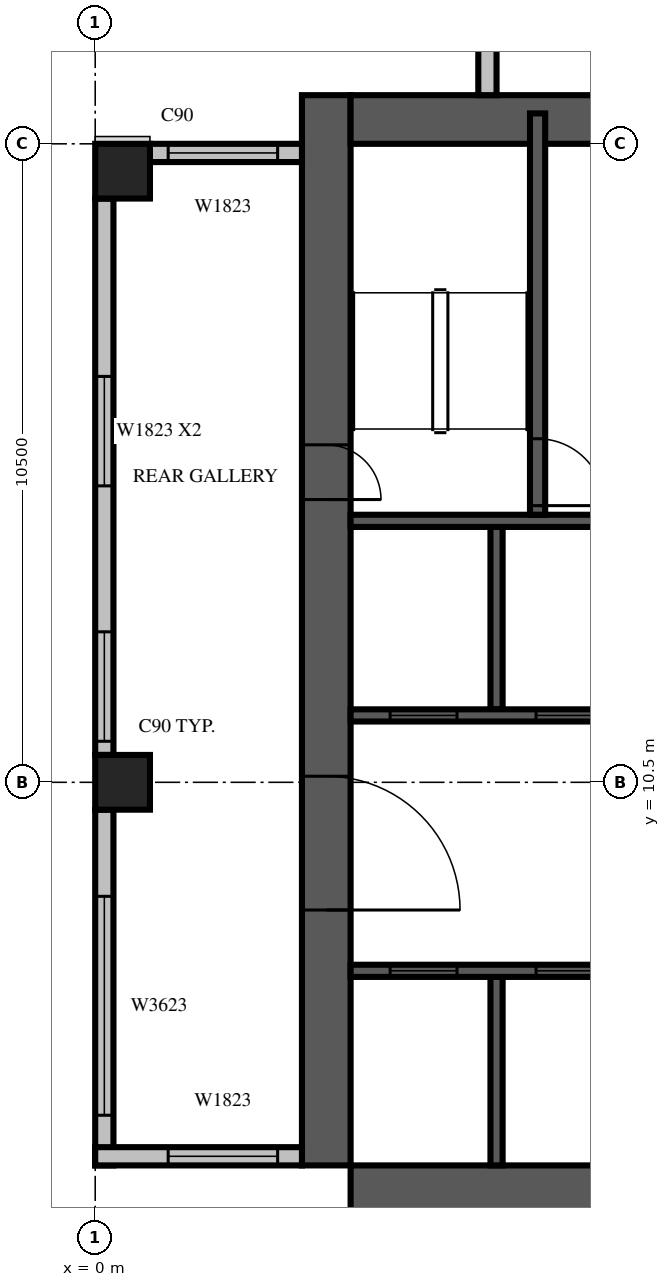
"""IFC4 building model, lengths in metres.
Left out: names, types, materials, properties, quantities, classifications, styles, units other than length and angle.
Written with IfcOpenShell. Run it as: python <this file> out.ifc"""

import sys

from ifc_helpers import new_model, si_unit, direction, frame, frame_2d, origin, origin_2d, place, context, subcontext, project, spatial, rectangle, extrude, source, transform, mapped, element, fill, save


model = new_model("IFC4")
c1 = context("Model", 3, precision=1e-05, world=origin(), true_north=direction((0.0, 1.0)))
c2 = subcontext(c1, "Body", "Model", "MODEL_VIEW")
j1 = project(units=[si_unit("LENGTHUNIT", "METRE"), si_unit("PLANEANGLEUNIT", "RADIAN")], contexts=[c1])
p1 = place(None, origin())
s1 = spatial("IfcSite", under=j1, at=p1, CompositionType="ELEMENT")
p2 = place(p1, origin())
s2 = spatial("IfcBuilding", under=s1, at=p2, CompositionType="ELEMENT")
p3 = place(p2, frame((0.0, 0.0, 204.4)))
s3 = spatial("IfcBuildingStorey", under=s2, at=p3, CompositionType="ELEMENT", Elevation=204.4)
m1 = source(origin(), c2, "Body", "SweptSolid", [
    extrude(rectangle(XDim=0.9, YDim=0.9, at=origin_2d()), origin(), (0.0, 0.0, 1.0), 3.8),
])
for number, where, z_axis, x_axis in (
    (1, (0.45, 10.5, 0.0), (0.0, 0.0, 1.0), (1.0, 0.0, 0.0)),
    (2, (0.45, 20.55, 0.0), (0.0, 0.0, 1.0), (1.0, 0.0, 0.0)),
):
    element("IfcColumn", number, at=place(p3, frame(where, z_axis=z_axis, x_axis=x_axis)), inside=s3, PredefinedType="COLUMN", context=c2, shape_type="MappedRepresentation", body=[
        mapped(m1, transform((0.0, 0.0, 0.0), scale=1.0)),
    ])
m2 = source(origin(), c2, "Body", "SweptSolid", [
    extrude(rectangle(XDim=17.6, YDim=0.8, at=frame_2d((8.8, 0.0))), origin(), (0.0, 0.0, 1.0), 3.8),
])
p4 = place(p3, frame((3.8, 4.2, 0.0), z_axis=(0.0, 0.0, 1.0), x_axis=(0.0, 1.0, 0.0)))
e3 = element("IfcWall", 3, at=p4, inside=s3, PredefinedType="SHEAR", context=c2, shape_type="MappedRepresentation", body=[
    mapped(m2, transform((0.0, 0.0, 0.0), scale=1.0)),
])
m3 = source(origin(), c2, "Body", "SweptSolid", [
    extrude(rectangle(XDim=2.2, YDim=2.1, at=frame_2d((1.1, 1.05))), frame((0.0, 0.41, 0.0), z_axis=(0.0, -1.0, 0.0), x_axis=(1.0, 0.0, 0.0)), (0.0, 0.0, 1.0), 0.82),
])
p5 = place(p4, frame((4.2, 0.0, 0.0)))
e4 = element("IfcOpeningElement", 4, at=p5, cuts=e3, PredefinedType="OPENING", context=c2, shape_type="MappedRepresentation", body=[
    mapped(m3, transform((0.0, 0.0, 0.0), scale=1.0)),
])
m4 = source(origin(), c2, "Body", "SweptSolid", [
    extrude(rectangle(XDim=0.9, YDim=2.1, at=frame_2d((0.45, 1.05))), frame((0.0, 0.41, 0.0), z_axis=(0.0, -1.0, 0.0), x_axis=(1.0, 0.0, 0.0)), (0.0, 0.0, 1.0), 0.82),
])
p6 = place(p4, frame((10.95, 0.0, 0.0)))
e5 = element("IfcOpeningElement", 5, at=p6, cuts=e3, PredefinedType="OPENING", context=c2, shape_type="MappedRepresentation", body=[
    mapped(m4, transform((0.0, 0.0, 0.0), scale=1.0)),
])
p7 = place(p3, frame((4.2, 3.8, 0.0), z_axis=(0.0, 0.0, 1.0), x_axis=(1.0, 0.0, 0.0)))
e6 = element("IfcWall", 6, at=p7, inside=s3, PredefinedType="SHEAR", context=c2, shape_type="MappedRepresentation", body=[
    mapped(m2, transform((0.0, 0.0, 0.0), scale=1.0)),
])
p8 = place(p7, frame((11.55, 0.0, 0.0)))
e7 = element("IfcOpeningElement", 7, at=p8, cuts=e6, PredefinedType="OPENING", context=c2, shape_type="MappedRepresentation", body=[
    mapped(m4, transform((0.0, 0.0, 0.0), scale=1.0)),
])
m5 = source(origin(), c2, "Body", "SweptSolid", [
    extrude(rectangle(XDim=16.8, YDim=0.8, at=frame_2d((8.4, 0.0))), origin(), (0.0, 0.0, 1.0), 3.8),
])
p9 = place(p3, frame((4.2, 21.4, 0.0), z_axis=(0.0, 0.0, 1.0), x_axis=(1.0, 0.0, 0.0)))
e8 = element("IfcWall", 8, at=p9, inside=s3, PredefinedType="SHEAR", context=c2, shape_type="MappedRepresentation", body=[
    mapped(m5, transform((0.0, 0.0, 0.0), scale=1.0)),
])
m6 = source(origin(), c2, "Body", "SweptSolid", [
    extrude(rectangle(XDim=1.2, YDim=2.1, at=frame_2d((0.6, 1.05))), frame((0.0, 0.41, 0.0), z_axis=(0.0, -1.0, 0.0), x_axis=(1.0, 0.0, 0.0)), (0.0, 0.0, 1.0), 0.82),
])
p10 = place(p9, frame((6.2, 0.0, 0.0)))
e9 = element("IfcOpeningElement", 9, at=p10, cuts=e8, PredefinedType="OPENING", context=c2, shape_type="MappedRepresentation", body=[
    mapped(m6, transform((0.0, 0.0, 0.0), scale=1.0)),
])
p11 = place(p3, frame((6.45, 38.4, 0.0), z_axis=(0.0, 0.0, 1.0), x_axis=(0.0, -1.0, 0.0)))
e10 = element("IfcWall", 10, at=p11, inside=s3, PredefinedType="STANDARD", context=c2, shape_type="SweptSolid", body=[
    extrude(rectangle(XDim=16.6, YDim=0.3, at=frame_2d((8.3, 0.0))), origin(), (0.0, 0.0, 1.0), 2.9),
])
m7 = source(origin(), c2, "Body", "SweptSolid", [
    extrude(rectangle(XDim=1.8, YDim=2.3, at=frame_2d((0.9, 1.15))), frame((0.0, 0.16, 0.0), z_axis=(0.0, -1.0, 0.0), x_axis=(1.0, 0.0, 0.0)), (0.0, 0.0, 1.0), 0.32),
])
p12 = place(p11, frame((1.15, 0.0, 0.6)))
e11 = element("IfcOpeningElement", 11, at=p12, cuts=e10, PredefinedType="OPENING", context=c2, shape_type="MappedRepresentation", body=[
    mapped(m7, transform((0.0, 0.0, 0.0), scale=1.0)),
])
p13 = place(p11, frame((5.162, 0.0, 0.6)))
e12 = element("IfcOpeningElement", 12, at=p13, cuts=e10, PredefinedType="OPENING", context=c2, shape_type="MappedRepresentation", body=[
    mapped(m7, transform((0.0, 0.0, 0.0), scale=1.0)),
])
p14 = place(p11, frame((9.438, 0.0, 0.6)))
e13 = element("IfcOpeningElement", 13, at=p14, cuts=e10, PredefinedType="OPENING", context=c2, shape_type="MappedRepresentation", body=[
    mapped(m7, transform((0.0, 0.0, 0.0), scale=1.0)),
])
m8 = source(origin(), c2, "Body", "SweptSolid", [
    extrude(rectangle(XDim=1.2, YDim=2.3, at=frame_2d((0.6, 1.15))), frame((0.0, 0.16, 0.0), z_axis=(0.0, -1.0, 0.0), x_axis=(1.0, 0.0, 0.0)), (0.0, 0.0, 1.0), 0.32),
])
p15 = place(p11, frame((14.338, 0.0, 0.6)))
e14 = element("IfcOpeningElement", 14, at=p15, cuts=e10, PredefinedType="OPENING", context=c2, shape_type="MappedRepresentation", body=[
    mapped(m8, transform((0.0, 0.0, 0.0), scale=1.0)),
])
p16 = place(p11, frame((11.887, 0.0, 0.6)))
e15 = element("IfcOpeningElement", 15, at=p16, cuts=e10, PredefinedType="OPENING", context=c2, shape_type="MappedRepresentation", body=[
    mapped(m7, transform((0.0, 0.0, 0.0), scale=1.0)),
])
m9 = source(origin(), c2, "Body", "SweptSolid", [
    extrude(rectangle(XDim=2.5, YDim=0.3, at=frame_2d((1.25, 0.0))), origin(), (0.0, 0.0, 1.0), 3.4),
])
p17 = place(p3, frame((3.4, 20.85, 0.0), z_axis=(0.0, 0.0, 1.0), x_axis=(-1.0, 0.0, 0.0)))
e16 = element("IfcWall", 16, at=p17, inside=s3, PredefinedType="STANDARD", context=c2, shape_type="MappedRepresentation", body=[
    mapped(m9, transform((0.0, 0.0, 0.0), scale=1.0)),
])
p18 = place(p17, frame((0.4, 0.0, 0.6)))
e17 = element("IfcOpeningElement", 17, at=p18, cuts=e16, PredefinedType="OPENING", context=c2, shape_type="MappedRepresentation", body=[
    mapped(m7, transform((0.0, 0.0, 0.0), scale=1.0)),
])
m10 = source(origin(), c2, "Body", "SweptSolid", [
    extrude(rectangle(XDim=9.15, YDim=0.3, at=frame_2d((4.575, 0.0))), origin(), (0.0, 0.0, 1.0), 3.4),
])
p19 = place(p3, frame((0.15, 20.1, 0.0), z_axis=(0.0, 0.0, 1.0), x_axis=(0.0, -1.0, 0.0)))
e18 = element("IfcWall", 18, at=p19, inside=s3, PredefinedType="STANDARD", context=c2, shape_type="MappedRepresentation", body=[
    mapped(m10, transform((0.0, 0.0, 0.0), scale=1.0)),
])
p20 = place(p19, frame((2.925, 0.0, 0.6)))
e19 = element("IfcOpeningElement", 19, at=p20, cuts=e18, PredefinedType="OPENING", context=c2, shape_type="MappedRepresentation", body=[
    mapped(m7, transform((0.0, 0.0, 0.0), scale=1.0)),
])
p21 = place(p19, frame((7.125, 0.0, 0.6)))
e20 = element("IfcOpeningElement", 20, at=p21, cuts=e18, PredefinedType="OPENING", context=c2, shape_type="MappedRepresentation", body=[
    mapped(m7, transform((0.0, 0.0, 0.0), scale=1.0)),
])
m11 = source(origin(), c2, "Body", "SweptSolid", [
    extrude(rectangle(XDim=5.85, YDim=0.3, at=frame_2d((2.925, 0.0))), origin(), (0.0, 0.0, 1.0), 3.4),
])
p22 = place(p3, frame((0.15, 10.05, 0.0), z_axis=(0.0, 0.0, 1.0), x_axis=(0.0, -1.0, 0.0)))
e21 = element("IfcWall", 21, at=p22, inside=s3, PredefinedType="STANDARD", context=c2, shape_type="MappedRepresentation", body=[
    mapped(m11, transform((0.0, 0.0, 0.0), scale=1.0)),
])
m12 = source(origin(), c2, "Body", "SweptSolid", [
    extrude(rectangle(XDim=3.6, YDim=2.3, at=frame_2d((1.8, 1.15))), frame((0.0, 0.16, 0.0), z_axis=(0.0, -1.0, 0.0), x_axis=(1.0, 0.0, 0.0)), (0.0, 0.0, 1.0), 0.32),
])
p23 = place(p22, frame((1.425, 0.0, 0.6)))
e22 = element("IfcOpeningElement", 22, at=p23, cuts=e21, PredefinedType="OPENING", context=c2, shape_type="MappedRepresentation", body=[
    mapped(m12, transform((0.0, 0.0, 0.0), scale=1.0)),
])
m13 = source(origin(), c2, "Body", "SweptSolid", [
    extrude(rectangle(XDim=3.4, YDim=0.3, at=frame_2d((1.7, 0.0))), origin(), (0.0, 0.0, 1.0), 3.4),
])
p24 = place(p3, frame((0.0, 4.35, 0.0), z_axis=(0.0, 0.0, 1.0), x_axis=(1.0, 0.0, 0.0)))
e23 = element("IfcWall", 23, at=p24, inside=s3, PredefinedType="STANDARD", context=c2, shape_type="MappedRepresentation", body=[
    mapped(m13, transform((0.0, 0.0, 0.0), scale=1.0)),
])
p25 = place(p24, frame((1.2, 0.0, 0.6)))
e24 = element("IfcOpeningElement", 24, at=p25, cuts=e23, PredefinedType="OPENING", context=c2, shape_type="MappedRepresentation", body=[
    mapped(m7, transform((0.0, 0.0, 0.0), scale=1.0)),
])
m14 = source(origin(), c2, "Body", "SweptSolid", [
    extrude(rectangle(XDim=3.1, YDim=0.2, at=frame_2d((1.55, 0.0))), origin(), (0.0, 0.0, 1.0), 3.8),
])
p26 = place(p3, frame((6.6, 4.2, 0.0), z_axis=(0.0, 0.0, 1.0), x_axis=(0.0, 1.0, 0.0)))
e25 = element("IfcWall", 25, at=p26, inside=s3, PredefinedType="SOLIDWALL", context=c2, shape_type="MappedRepresentation", body=[
    mapped(m14, transform((0.0, 0.0, 0.0), scale=1.0)),
])
m15 = source(origin(), c2, "Body", "SweptSolid", [
    extrude(rectangle(XDim=3.0, YDim=0.2, at=frame_2d((1.5, 0.0))), origin(), (0.0, 0.0, 1.0), 3.8),
])
p27 = place(p3, frame((6.6, 11.7, 0.0), z_axis=(0.0, 0.0, 1.0), x_axis=(0.0, 1.0, 0.0)))
e26 = element("IfcWall", 26, at=p27, inside=s3, PredefinedType="SOLIDWALL", context=c2, shape_type="MappedRepresentation", body=[
    mapped(m15, transform((0.0, 0.0, 0.0), scale=1.0)),
])
m16 = source(origin(), c2, "Body", "SweptSolid", [
    extrude(rectangle(XDim=9.6, YDim=0.2, at=frame_2d((4.8, 0.0))), origin(), (0.0, 0.0, 1.0), 3.8),
])
p28 = place(p3, frame((4.2, 7.4, 0.0), z_axis=(0.0, 0.0, 1.0), x_axis=(1.0, 0.0, 0.0)))
e27 = element("IfcWall", 27, at=p28, inside=s3, PredefinedType="SOLIDWALL", context=c2, shape_type="MappedRepresentation", body=[
    mapped(m16, transform((0.0, 0.0, 0.0), scale=1.0)),
])
m17 = source(origin(), c2, "Body", "SweptSolid", [
    extrude(rectangle(XDim=1.1, YDim=2.1, at=frame_2d((0.55, 1.05))), frame((0.0, 0.11, 0.0), z_axis=(0.0, -1.0, 0.0), x_axis=(1.0, 0.0, 0.0)), (0.0, 0.0, 1.0), 0.22),
])
p29 = place(p28, frame((0.65, 0.0, 0.0)))
e28 = element("IfcOpeningElement", 28, at=p29, cuts=e27, PredefinedType="OPENING", context=c2, shape_type="MappedRepresentation", body=[
    mapped(m17, transform((0.0, 0.0, 0.0), scale=1.0)),
])
p30 = place(p28, frame((3.05, 0.0, 0.0)))
e29 = element("IfcOpeningElement", 29, at=p30, cuts=e27, PredefinedType="OPENING", context=c2, shape_type="MappedRepresentation", body=[
    mapped(m17, transform((0.0, 0.0, 0.0), scale=1.0)),
])
p31 = place(p28, frame((5.45, 0.0, 0.0)))
e30 = element("IfcOpeningElement", 30, at=p31, cuts=e27, PredefinedType="OPENING", context=c2, shape_type="MappedRepresentation", body=[
    mapped(m17, transform((0.0, 0.0, 0.0), scale=1.0)),
])
p32 = place(p28, frame((7.85, 0.0, 0.0)))
e31 = element("IfcOpeningElement", 31, at=p32, cuts=e27, PredefinedType="OPENING", context=c2, shape_type="MappedRepresentation", body=[
    mapped(m17, transform((0.0, 0.0, 0.0), scale=1.0)),
])
m18 = source(origin(), c2, "Body", "SweptSolid", [
    extrude(rectangle(XDim=4.8, YDim=0.2, at=frame_2d((2.4, 0.0))), origin(), (0.0, 0.0, 1.0), 3.8),
])
p33 = place(p3, frame((4.2, 11.6, 0.0), z_axis=(0.0, 0.0, 1.0), x_axis=(1.0, 0.0, 0.0)))
e32 = element("IfcWall", 32, at=p33, inside=s3, PredefinedType="SOLIDWALL", context=c2, shape_type="MappedRepresentation", body=[
    mapped(m18, transform((0.0, 0.0, 0.0), scale=1.0)),
])
p34 = place(p33, frame((0.65, 0.0, 0.0)))
e33 = element("IfcOpeningElement", 33, at=p34, cuts=e32, PredefinedType="OPENING", context=c2, shape_type="MappedRepresentation", body=[
    mapped(m17, transform((0.0, 0.0, 0.0), scale=1.0)),
])
p35 = place(p33, frame((3.05, 0.0, 0.0)))
e34 = element("IfcOpeningElement", 34, at=p35, cuts=e32, PredefinedType="OPENING", context=c2, shape_type="MappedRepresentation", body=[
    mapped(m17, transform((0.0, 0.0, 0.0), scale=1.0)),
])
p36 = place(p3, frame((4.2, 14.8, 0.0), z_axis=(0.0, 0.0, 1.0), x_axis=(1.0, 0.0, 0.0)))
e35 = element("IfcWall", 35, at=p36, inside=s3, PredefinedType="SOLIDWALL", context=c2, shape_type="MappedRepresentation", body=[
    mapped(m18, transform((0.0, 0.0, 0.0), scale=1.0)),
])
m19 = source(origin(), c2, "Body", "SweptSolid", [
    extrude(rectangle(XDim=6.6, YDim=0.25, at=frame_2d((3.3, 0.0))), origin(), (0.0, 0.0, 1.0), 3.4),
])
p37 = place(p3, frame((7.275, 14.9, 0.0), z_axis=(0.0, 0.0, 1.0), x_axis=(0.0, 1.0, 0.0)))
e36 = element("IfcWall", 36, at=p37, inside=s3, PredefinedType="SOLIDWALL", context=c2, shape_type="MappedRepresentation", body=[
    mapped(m19, transform((0.0, 0.0, 0.0), scale=1.0)),
])
m20 = source(origin(), c2, "Body", "SweptSolid", [
    extrude(rectangle(XDim=1.1, YDim=2.1, at=frame_2d((0.55, 1.05))), frame((0.0, 0.135, 0.0), z_axis=(0.0, -1.0, 0.0), x_axis=(1.0, 0.0, 0.0)), (0.0, 0.0, 1.0), 0.27),
])
p38 = place(p37, frame((0.15, 0.0, 0.0)))
e37 = element("IfcOpeningElement", 37, at=p38, cuts=e36, PredefinedType="OPENING", context=c2, shape_type="MappedRepresentation", body=[
    mapped(m20, transform((0.0, 0.0, 0.0), scale=1.0)),
])
m21 = source(origin(), c2, "Body", "SweptSolid", [
    extrude(rectangle(XDim=1.8, YDim=2.3, at=frame_2d((0.9, 1.15))), frame((0.0, 0.03, 0.0), z_axis=(0.0, -1.0, 0.0), x_axis=(1.0, 0.0, 0.0)), (0.0, 0.0, 1.0), 0.06),
])
p39 = place(p18, origin())
e38 = element("IfcWindow", 38, at=p39, inside=s3, PartitioningType="SINGLE_PANEL", PredefinedType="WINDOW", context=c2, shape_type="MappedRepresentation", body=[
    mapped(m21, transform((0.0, 0.0, 0.0), scale=1.0)),
])
fill(e17, e38)
p40 = place(p20, origin())
e39 = element("IfcWindow", 39, at=p40, inside=s3, PartitioningType="SINGLE_PANEL", PredefinedType="WINDOW", context=c2, shape_type="MappedRepresentation", body=[
    mapped(m21, transform((0.0, 0.0, 0.0), scale=1.0)),
])
fill(e19, e39)
p41 = place(p21, origin())
e40 = element("IfcWindow", 40, at=p41, inside=s3, PartitioningType="SINGLE_PANEL", PredefinedType="WINDOW", context=c2, shape_type="MappedRepresentation", body=[
    mapped(m21, transform((0.0, 0.0, 0.0), scale=1.0)),
])
fill(e20, e40)
m22 = source(origin(), c2, "Body", "SweptSolid", [
    extrude(rectangle(XDim=3.6, YDim=2.3, at=frame_2d((1.8, 1.15))), frame((0.0, 0.03, 0.0), z_axis=(0.0, -1.0, 0.0), x_axis=(1.0, 0.0, 0.0)), (0.0, 0.0, 1.0), 0.06),
])
p42 = place(p23, origin())
e41 = element("IfcWindow", 41, at=p42, inside=s3, PartitioningType="SINGLE_PANEL", PredefinedType="WINDOW", context=c2, shape_type="MappedRepresentation", body=[
    mapped(m22, transform((0.0, 0.0, 0.0), scale=1.0)),
])
fill(e22, e41)
p43 = place(p25, origin())
e42 = element("IfcWindow", 42, at=p43, inside=s3, PartitioningType="SINGLE_PANEL", PredefinedType="WINDOW", context=c2, shape_type="MappedRepresentation", body=[
    mapped(m21, transform((0.0, 0.0, 0.0), scale=1.0)),
])
fill(e24, e42)
m23 = source(origin(), c2, "Body", "SweptSolid", [
    extrude(rectangle(XDim=1.1, YDim=2.1, at=frame_2d((0.55, 1.05))), frame((0.0, 0.025, 0.0), z_axis=(0.0, -1.0, 0.0), x_axis=(1.0, 0.0, 0.0)), (0.0, 0.0, 1.0), 0.05),
])
p44 = place(p29, origin())
e43 = element("IfcDoor", 43, at=p44, inside=s3, OperationType="SLIDING_TO_LEFT", PredefinedType="DOOR", context=c2, shape_type="MappedRepresentation", body=[
    mapped(m23, transform((0.0, 0.0, 0.0), scale=1.0)),
])
fill(e28, e43)
p45 = place(p30, origin())
e44 = element("IfcDoor", 44, at=p45, inside=s3, OperationType="SLIDING_TO_LEFT", PredefinedType="DOOR", context=c2, shape_type="MappedRepresentation", body=[
    mapped(m23, transform((0.0, 0.0, 0.0), scale=1.0)),
])
fill(e29, e44)
p46 = place(p34, origin())
e45 = element("IfcDoor", 45, at=p46, inside=s3, OperationType="SLIDING_TO_LEFT", PredefinedType="DOOR", context=c2, shape_type="MappedRepresentation", body=[
    mapped(m23, transform((0.0, 0.0, 0.0), scale=1.0)),
])
fill(e33, e45)
p47 = place(p35, origin())
e46 = element("IfcDoor", 46, at=p47, inside=s3, OperationType="SLIDING_TO_LEFT", PredefinedType="DOOR", context=c2, shape_type="MappedRepresentation", body=[
    mapped(m23, transform((0.0, 0.0, 0.0), scale=1.0)),
])
fill(e34, e46)
p48 = place(p38, origin())
e47 = element("IfcDoor", 47, at=p48, inside=s3, OperationType="SINGLE_SWING_RIGHT", PredefinedType="DOOR", context=c2, shape_type="MappedRepresentation", body=[
    mapped(m23, transform((0.0, 0.0, 0.0), scale=1.0)),
])
fill(e37, e47)
m24 = source(origin(), c2, "Body", "SweptSolid", [
    extrude(rectangle(XDim=2.2, YDim=2.1, at=frame_2d((1.1, 1.05))), frame((0.0, 0.025, 0.0), z_axis=(0.0, -1.0, 0.0), x_axis=(1.0, 0.0, 0.0)), (0.0, 0.0, 1.0), 0.05),
])
p49 = place(p5, origin())
e48 = element("IfcDoor", 48, at=p49, inside=s3, OperationType="DOUBLE_DOOR_SINGLE_SWING", PredefinedType="DOOR", context=c2, shape_type="MappedRepresentation", body=[
    mapped(m24, transform((0.0, 0.0, 0.0), scale=1.0)),
])
fill(e4, e48)
m25 = source(origin(), c2, "Body", "SweptSolid", [
    extrude(rectangle(XDim=0.9, YDim=2.1, at=frame_2d((0.45, 1.05))), frame((0.0, 0.025, 0.0), z_axis=(0.0, -1.0, 0.0), x_axis=(1.0, 0.0, 0.0)), (0.0, 0.0, 1.0), 0.05),
])
p50 = place(p6, origin())
e49 = element("IfcDoor", 49, at=p50, inside=s3, OperationType="SINGLE_SWING_RIGHT", PredefinedType="DOOR", context=c2, shape_type="MappedRepresentation", body=[
    mapped(m25, transform((0.0, 0.0, 0.0), scale=1.0)),
])
fill(e5, e49)
save(model, sys.argv[1])
